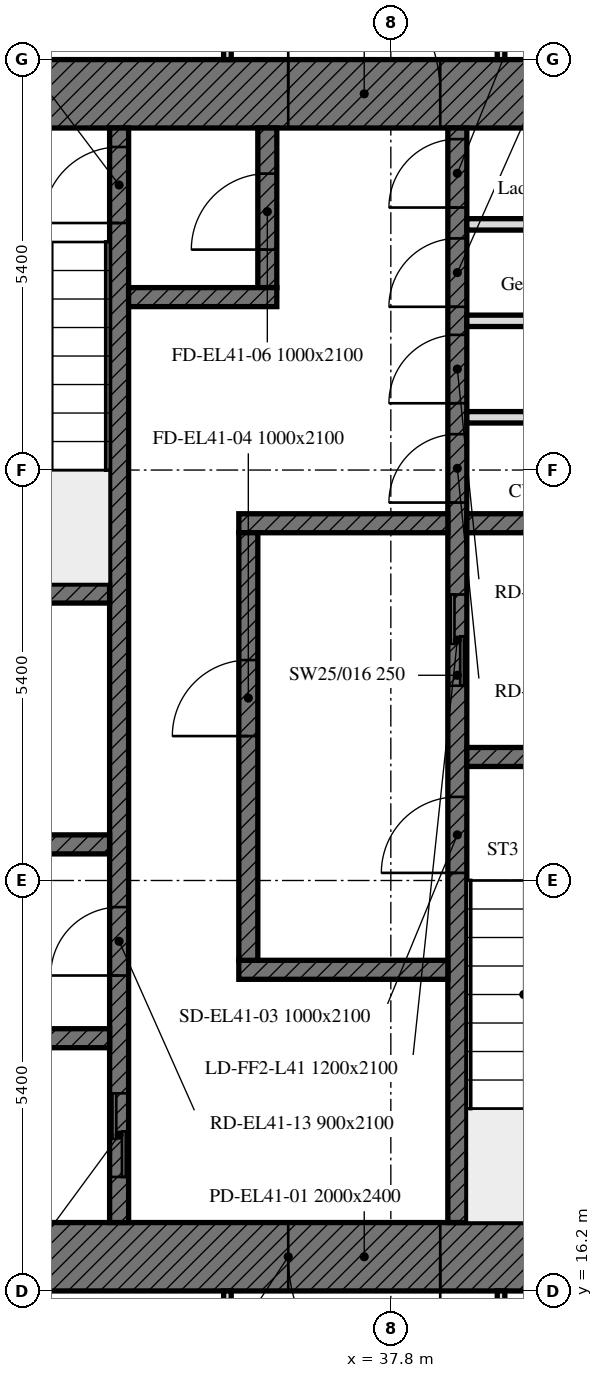
"""IFC4 building model, lengths in metres.
Left out: names, types, materials, properties, quantities, classifications, styles, units other than length and angle.
Written with IfcOpenShell. Run it as: python <this file> out.ifc"""

import sys

from ifc_helpers import new_model, si_unit, direction, frame, frame_2d, origin, place, context, subcontext, project, spatial, rectangle, extrude, element, fill, save


model = new_model("IFC4")
c1 = context("Model", 3, precision=1e-05, world=origin(), true_north=direction((0.0, 1.0)))
c2 = subcontext(c1, "Body", "Model", "MODEL_VIEW")
j1 = project(units=[si_unit("LENGTHUNIT", "METRE"), si_unit("PLANEANGLEUNIT", "RADIAN")], contexts=[c1])
p1 = place(None, origin())
s1 = spatial("IfcSite", under=j1, at=p1, CompositionType="ELEMENT")
p2 = place(p1, origin())
s2 = spatial("IfcBuilding", under=s1, at=p2, CompositionType="ELEMENT")
p3 = place(p2, frame((0.0, 0.0, 172.6)))
s3 = spatial("IfcBuildingStorey", under=s2, at=p3, CompositionType="ELEMENT", Elevation=172.6)
p4 = place(p3, frame((42.0, 16.65, 0.0), z_axis=(0.0, 0.0, 1.0), x_axis=(-1.0, 0.0, 0.0)))
e1 = element("IfcWall", 1, at=p4, inside=s3, PredefinedType="SOLIDWALL", context=c2, shape_type="SweptSolid", body=[
    extrude(rectangle(XDim=11.1, YDim=0.9, at=frame_2d((5.55, 0.0))), origin(), (0.0, 0.0, 1.0), 2.8),
])
p5 = place(p4, frame((3.55, 0.0, 0.0)))
e2 = element("IfcOpeningElement", 2, at=p5, cuts=e1, PredefinedType="OPENING", context=c2, shape_type="SweptSolid", body=[
    extrude(rectangle(XDim=2.0, YDim=2.4, at=frame_2d((1.0, 1.2))), frame((0.0, 0.45, 0.0), z_axis=(0.0, -1.0, 0.0), x_axis=(1.0, 0.0, 0.0)), (0.0, 0.0, 1.0), 0.9),
])
p6 = place(p3, frame((30.9, 31.95, 0.0), z_axis=(0.0, 0.0, 1.0), x_axis=(1.0, 0.0, 0.0)))
e3 = element("IfcWall", 3, at=p6, inside=s3, PredefinedType="SOLIDWALL", context=c2, shape_type="SweptSolid", body=[
    extrude(rectangle(XDim=11.1, YDim=0.9, at=frame_2d((5.55, 0.0))), origin(), (0.0, 0.0, 1.0), 2.8),
])
p7 = place(p6, frame((5.55, 0.0, 0.0)))
e4 = element("IfcOpeningElement", 4, at=p7, cuts=e3, PredefinedType="OPENING", context=c2, shape_type="SweptSolid", body=[
    extrude(rectangle(XDim=2.0, YDim=2.4, at=frame_2d((1.0, 1.2))), frame((0.0, 0.45, 0.0), z_axis=(0.0, -1.0, 0.0), x_axis=(1.0, 0.0, 0.0)), (0.0, 0.0, 1.0), 0.9),
])
p8 = place(p3, frame((38.675, 17.1, 0.0), z_axis=(0.0, 0.0, 1.0), x_axis=(0.0, 1.0, 0.0)))
e5 = element("IfcWall", 5, at=p8, inside=s3, PredefinedType="SOLIDWALL", context=c2, shape_type="SweptSolid", body=[
    extrude(rectangle(XDim=14.4, YDim=0.25, at=frame_2d((7.2, 0.0))), origin(), (0.0, 0.0, 1.0), 2.8),
])
p9 = place(p8, frame((4.6, 0.0, 0.0)))
e6 = element("IfcOpeningElement", 6, at=p9, cuts=e5, PredefinedType="OPENING", context=c2, shape_type="SweptSolid", body=[
    extrude(rectangle(XDim=1.0, YDim=2.1, at=frame_2d((0.5, 1.05))), frame((0.0, 0.125, 0.0), z_axis=(0.0, -1.0, 0.0), x_axis=(1.0, 0.0, 0.0)), (0.0, 0.0, 1.0), 0.25),
])
p10 = place(p8, frame((7.062, 0.0, 0.0)))
e7 = element("IfcOpeningElement", 7, at=p10, cuts=e5, PredefinedType="OPENING", context=c2, shape_type="SweptSolid", body=[
    extrude(rectangle(XDim=1.2, YDim=2.1, at=frame_2d((0.6, 1.05))), frame((0.0, 0.125, 0.0), z_axis=(0.0, -1.0, 0.0), x_axis=(1.0, 0.0, 0.0)), (0.0, 0.0, 1.0), 0.25),
])
p11 = place(p8, frame((9.472, 0.0, 0.0)))
e8 = element("IfcOpeningElement", 8, at=p11, cuts=e5, PredefinedType="OPENING", context=c2, shape_type="SweptSolid", body=[
    extrude(rectangle(XDim=0.9, YDim=2.1, at=frame_2d((0.45, 1.05))), frame((0.0, 0.125, 0.0), z_axis=(0.0, -1.0, 0.0), x_axis=(1.0, 0.0, 0.0)), (0.0, 0.0, 1.0), 0.25),
])
p12 = place(p8, frame((10.779, 0.0, 0.0)))
e9 = element("IfcOpeningElement", 9, at=p12, cuts=e5, PredefinedType="OPENING", context=c2, shape_type="SweptSolid", body=[
    extrude(rectangle(XDim=0.9, YDim=2.1, at=frame_2d((0.45, 1.05))), frame((0.0, 0.125, 0.0), z_axis=(0.0, -1.0, 0.0), x_axis=(1.0, 0.0, 0.0)), (0.0, 0.0, 1.0), 0.25),
])
p13 = place(p8, frame((12.048, 0.0, 0.0)))
e10 = element("IfcOpeningElement", 10, at=p13, cuts=e5, PredefinedType="OPENING", context=c2, shape_type="SweptSolid", body=[
    extrude(rectangle(XDim=0.9, YDim=2.1, at=frame_2d((0.45, 1.05))), frame((0.0, 0.125, 0.0), z_axis=(0.0, -1.0, 0.0), x_axis=(1.0, 0.0, 0.0)), (0.0, 0.0, 1.0), 0.25),
])
p14 = place(p8, frame((13.354, 0.0, 0.0)))
e11 = element("IfcOpeningElement", 11, at=p14, cuts=e5, PredefinedType="OPENING", context=c2, shape_type="SweptSolid", body=[
    extrude(rectangle(XDim=0.9, YDim=2.1, at=frame_2d((0.45, 1.05))), frame((0.0, 0.125, 0.0), z_axis=(0.0, -1.0, 0.0), x_axis=(1.0, 0.0, 0.0)), (0.0, 0.0, 1.0), 0.25),
])
p15 = place(p3, frame((34.225, 17.1, 0.0), z_axis=(0.0, 0.0, 1.0), x_axis=(0.0, 1.0, 0.0)))
e12 = element("IfcWall", 12, at=p15, inside=s3, PredefinedType="SOLIDWALL", context=c2, shape_type="SweptSolid", body=[
    extrude(rectangle(XDim=14.4, YDim=0.25, at=frame_2d((7.2, 0.0))), origin(), (0.0, 0.0, 1.0), 2.8),
])
p16 = place(p15, frame((13.15, 0.0, 0.0)))
e13 = element("IfcOpeningElement", 13, at=p16, cuts=e12, PredefinedType="OPENING", context=c2, shape_type="SweptSolid", body=[
    extrude(rectangle(XDim=1.0, YDim=2.1, at=frame_2d((0.5, 1.05))), frame((0.0, 0.125, 0.0), z_axis=(0.0, -1.0, 0.0), x_axis=(1.0, 0.0, 0.0)), (0.0, 0.0, 1.0), 0.25),
])
p17 = place(p15, frame((0.6, 0.0, 0.0)))
e14 = element("IfcOpeningElement", 14, at=p17, cuts=e12, PredefinedType="OPENING", context=c2, shape_type="SweptSolid", body=[
    extrude(rectangle(XDim=1.1, YDim=2.1, at=frame_2d((0.55, 1.05))), frame((0.0, 0.125, 0.0), z_axis=(0.0, -1.0, 0.0), x_axis=(1.0, 0.0, 0.0)), (0.0, 0.0, 1.0), 0.25),
])
p18 = place(p15, frame((3.25, 0.0, 0.0)))
e15 = element("IfcOpeningElement", 15, at=p18, cuts=e12, PredefinedType="OPENING", context=c2, shape_type="SweptSolid", body=[
    extrude(rectangle(XDim=0.9, YDim=2.1, at=frame_2d((0.45, 1.05))), frame((0.0, 0.125, 0.0), z_axis=(0.0, -1.0, 0.0), x_axis=(1.0, 0.0, 0.0)), (0.0, 0.0, 1.0), 0.25),
])
p19 = place(p3, frame((38.8, 23.225, 0.0), z_axis=(0.0, 0.0, 1.0), x_axis=(1.0, 0.0, 0.0)))
e16 = element("IfcWall", 16, at=p19, inside=s3, PredefinedType="SOLIDWALL", context=c2, shape_type="SweptSolid", body=[
    extrude(rectangle(XDim=3.2, YDim=0.25, at=frame_2d((1.6, 0.0))), origin(), (0.0, 0.0, 1.0), 2.8),
])
for number, where, z_axis, x_axis in (
    (17, (30.9, 25.375, 0.0), (0.0, 0.0, 1.0), (1.0, 0.0, 0.0)),
    (18, (30.9, 22.075, 0.0), (0.0, 0.0, 1.0), (1.0, 0.0, 0.0)),
):
    element("IfcWall", number, at=place(p3, frame(where, z_axis=z_axis, x_axis=x_axis)), inside=s3, PredefinedType="SOLIDWALL", context=c2, shape_type="SweptSolid", body=[
        extrude(rectangle(XDim=3.2, YDim=0.25, at=frame_2d((1.6, 0.0))), origin(), (0.0, 0.0, 1.0), 2.8),
    ])
p20 = place(p3, frame((38.8, 26.3, 0.0), z_axis=(0.0, 0.0, 1.0), x_axis=(1.0, 0.0, 0.0)))
e19 = element("IfcWall", 19, at=p20, inside=s3, PredefinedType="SOLIDWALL", context=c2, shape_type="SweptSolid", body=[
    extrude(rectangle(XDim=3.2, YDim=0.25, at=frame_2d((1.6, 0.0))), origin(), (0.0, 0.0, 1.0), 2.8),
])
for number, where, z_axis, x_axis in (
    (20, (35.8, 26.3, 0.0), (0.0, 0.0, 1.0), (1.0, 0.0, 0.0)),
    (21, (35.8, 20.425, 0.0), (0.0, 0.0, 1.0), (1.0, 0.0, 0.0)),
):
    element("IfcWall", number, at=place(p3, frame(where, z_axis=z_axis, x_axis=x_axis)), inside=s3, PredefinedType="SOLIDWALL", context=c2, shape_type="SweptSolid", body=[
        extrude(rectangle(XDim=2.75, YDim=0.25, at=frame_2d((1.375, 0.0))), origin(), (0.0, 0.0, 1.0), 2.8),
    ])
p21 = place(p3, frame((36.175, 29.4, 0.0), z_axis=(0.0, 0.0, 1.0), x_axis=(0.0, 1.0, 0.0)))
e22 = element("IfcWall", 22, at=p21, inside=s3, PredefinedType="SOLIDWALL", context=c2, shape_type="SweptSolid", body=[
    extrude(rectangle(XDim=2.1, YDim=0.25, at=frame_2d((1.05, 0.0))), origin(), (0.0, 0.0, 1.0), 2.8),
])
p22 = place(p21, frame((0.5, 0.0, 0.0)))
e23 = element("IfcOpeningElement", 23, at=p22, cuts=e22, PredefinedType="OPENING", context=c2, shape_type="SweptSolid", body=[
    extrude(rectangle(XDim=1.0, YDim=2.1, at=frame_2d((0.5, 1.05))), frame((0.0, 0.125, 0.0), z_axis=(0.0, -1.0, 0.0), x_axis=(1.0, 0.0, 0.0)), (0.0, 0.0, 1.0), 0.25),
])
p23 = place(p3, frame((34.35, 29.275, 0.0), z_axis=(0.0, 0.0, 1.0), x_axis=(1.0, 0.0, 0.0)))
e24 = element("IfcWall", 24, at=p23, inside=s3, PredefinedType="SOLIDWALL", context=c2, shape_type="SweptSolid", body=[
    extrude(rectangle(XDim=1.95, YDim=0.25, at=frame_2d((0.975, 0.0))), origin(), (0.0, 0.0, 1.0), 2.8),
])
p24 = place(p3, frame((35.925, 20.55, 0.0), z_axis=(0.0, 0.0, 1.0), x_axis=(0.0, 1.0, 0.0)))
e25 = element("IfcWall", 25, at=p24, inside=s3, PredefinedType="SOLIDWALL", context=c2, shape_type="SweptSolid", body=[
    extrude(rectangle(XDim=5.625, YDim=0.25, at=frame_2d((2.812, 0.0))), origin(), (0.0, 0.0, 1.0), 2.8),
])
p25 = place(p24, frame((2.95, 0.0, 0.0)))
e26 = element("IfcOpeningElement", 26, at=p25, cuts=e25, PredefinedType="OPENING", context=c2, shape_type="SweptSolid", body=[
    extrude(rectangle(XDim=1.0, YDim=2.1, at=frame_2d((0.5, 1.05))), frame((0.0, 0.125, 0.0), z_axis=(0.0, -1.0, 0.0), x_axis=(1.0, 0.0, 0.0)), (0.0, 0.0, 1.0), 0.25),
])
p26 = place(p3, frame((30.9, 19.525, 0.0), z_axis=(0.0, 0.0, 1.0), x_axis=(1.0, 0.0, 0.0)))
e27 = element("IfcWall", 27, at=p26, inside=s3, PredefinedType="SOLIDWALL", context=c2, shape_type="SweptSolid", body=[
    extrude(rectangle(XDim=3.2, YDim=0.25, at=frame_2d((1.6, 0.0))), origin(), (0.0, 0.0, 1.0), 2.8),
])
for number, where, z_axis, x_axis in (
    (28, (38.8, 27.694, 0.0), (0.0, 0.0, 1.0), (1.0, 0.0, 0.0)),
    (29, (38.8, 28.963, 0.0), (0.0, 0.0, 1.0), (1.0, 0.0, 0.0)),
    (30, (38.8, 30.232, 0.0), (0.0, 0.0, 1.0), (1.0, 0.0, 0.0)),
):
    element("IfcWall", number, at=place(p3, frame(where, z_axis=z_axis, x_axis=x_axis)), inside=s3, PredefinedType="PARTITIONING", context=c2, shape_type="SweptSolid", body=[
        extrude(rectangle(XDim=3.2, YDim=0.15, at=frame_2d((1.6, 0.0))), origin(), (0.0, 0.0, 1.0), 2.8),
    ])
for number, where, z_axis, x_axis in (
    (31, (35.65, 35.475, 0.0), (0.0, 0.0, 1.0), (0.0, -1.0, 0.0)),
    (32, (39.25, 32.4, 0.0), (0.0, 0.0, 1.0), (0.0, 1.0, 0.0)),
):
    element("IfcWall", number, at=place(p3, frame(where, z_axis=z_axis, x_axis=x_axis)), inside=s3, PredefinedType="PARTITIONING", context=c2, shape_type="SweptSolid", body=[
        extrude(rectangle(XDim=3.075, YDim=0.1, at=frame_2d((1.538, 0.0))), origin(), (0.0, 0.0, 1.0), 2.8),
    ])
for number, where, z_axis, x_axis in (
    (33, (35.65, 16.2, 0.0), (0.0, 0.0, 1.0), (0.0, -1.0, 0.0)),
    (34, (39.25, 9.975, 0.0), (0.0, 0.0, 1.0), (0.0, 1.0, 0.0)),
):
    element("IfcWall", number, at=place(p3, frame(where, z_axis=z_axis, x_axis=x_axis)), inside=s3, PredefinedType="PARTITIONING", context=c2, shape_type="SweptSolid", body=[
        extrude(rectangle(XDim=6.225, YDim=0.1, at=frame_2d((3.112, 0.0))), origin(), (0.0, 0.0, 1.0), 2.2),
    ])
p27 = place(p5, origin())
e35 = element("IfcDoor", 35, at=p27, inside=s3, OperationType="DOUBLE_DOOR_SINGLE_SWING", PredefinedType="DOOR", context=c2, shape_type="SweptSolid", body=[
    extrude(rectangle(XDim=2.0, YDim=2.4, at=frame_2d((1.0, 1.2))), frame((0.0, 0.025, 0.0), z_axis=(0.0, -1.0, 0.0), x_axis=(1.0, 0.0, 0.0)), (0.0, 0.0, 1.0), 0.05),
])
fill(e2, e35)
p28 = place(p7, origin())
e36 = element("IfcDoor", 36, at=p28, inside=s3, OperationType="DOUBLE_DOOR_SINGLE_SWING", PredefinedType="DOOR", context=c2, shape_type="SweptSolid", body=[
    extrude(rectangle(XDim=2.0, YDim=2.4, at=frame_2d((1.0, 1.2))), frame((0.0, 0.025, 0.0), z_axis=(0.0, -1.0, 0.0), x_axis=(1.0, 0.0, 0.0)), (0.0, 0.0, 1.0), 0.05),
])
fill(e4, e36)
p29 = place(p9, origin())
e37 = element("IfcDoor", 37, at=p29, inside=s3, OperationType="SINGLE_SWING_LEFT", PredefinedType="DOOR", context=c2, shape_type="SweptSolid", body=[
    extrude(rectangle(XDim=1.0, YDim=2.1, at=frame_2d((0.5, 1.05))), frame((0.0, 0.025, 0.0), z_axis=(0.0, -1.0, 0.0), x_axis=(1.0, 0.0, 0.0)), (0.0, 0.0, 1.0), 0.05),
])
fill(e6, e37)
p30 = place(p25, origin())
e38 = element("IfcDoor", 38, at=p30, inside=s3, OperationType="SINGLE_SWING_LEFT", PredefinedType="DOOR", context=c2, shape_type="SweptSolid", body=[
    extrude(rectangle(XDim=1.0, YDim=2.1, at=frame_2d((0.5, 1.05))), frame((0.0, 0.025, 0.0), z_axis=(0.0, -1.0, 0.0), x_axis=(1.0, 0.0, 0.0)), (0.0, 0.0, 1.0), 0.05),
])
fill(e26, e38)
p31 = place(p16, origin())
e39 = element("IfcDoor", 39, at=p31, inside=s3, OperationType="SINGLE_SWING_LEFT", PredefinedType="DOOR", context=c2, shape_type="SweptSolid", body=[
    extrude(rectangle(XDim=1.0, YDim=2.1, at=frame_2d((0.5, 1.05))), frame((0.0, 0.025, 0.0), z_axis=(0.0, -1.0, 0.0), x_axis=(1.0, 0.0, 0.0)), (0.0, 0.0, 1.0), 0.05),
])
fill(e13, e39)
p32 = place(p22, origin())
e40 = element("IfcDoor", 40, at=p32, inside=s3, OperationType="SINGLE_SWING_LEFT", PredefinedType="DOOR", context=c2, shape_type="SweptSolid", body=[
    extrude(rectangle(XDim=1.0, YDim=2.1, at=frame_2d((0.5, 1.05))), frame((0.0, 0.025, 0.0), z_axis=(0.0, -1.0, 0.0), x_axis=(1.0, 0.0, 0.0)), (0.0, 0.0, 1.0), 0.05),
])
fill(e23, e40)
p33 = place(p10, origin())
e41 = element("IfcDoor", 41, at=p33, inside=s3, OperationType="DOUBLE_DOOR_SLIDING", PredefinedType="DOOR", context=c2, shape_type="SweptSolid", body=[
    extrude(rectangle(XDim=1.2, YDim=2.1, at=frame_2d((0.6, 1.05))), frame((0.0, 0.025, 0.0), z_axis=(0.0, -1.0, 0.0), x_axis=(1.0, 0.0, 0.0)), (0.0, 0.0, 1.0), 0.05),
])
fill(e7, e41)
p34 = place(p17, origin())
e42 = element("IfcDoor", 42, at=p34, inside=s3, OperationType="DOUBLE_DOOR_SLIDING", PredefinedType="DOOR", context=c2, shape_type="SweptSolid", body=[
    extrude(rectangle(XDim=1.1, YDim=2.1, at=frame_2d((0.55, 1.05))), frame((0.0, 0.025, 0.0), z_axis=(0.0, -1.0, 0.0), x_axis=(1.0, 0.0, 0.0)), (0.0, 0.0, 1.0), 0.05),
])
fill(e14, e42)
p35 = place(p11, origin())
e43 = element("IfcDoor", 43, at=p35, inside=s3, OperationType="SINGLE_SWING_LEFT", PredefinedType="DOOR", context=c2, shape_type="SweptSolid", body=[
    extrude(rectangle(XDim=0.9, YDim=2.1, at=frame_2d((0.45, 1.05))), frame((0.0, 0.025, 0.0), z_axis=(0.0, -1.0, 0.0), x_axis=(1.0, 0.0, 0.0)), (0.0, 0.0, 1.0), 0.05),
])
fill(e8, e43)
p36 = place(p12, origin())
e44 = element("IfcDoor", 44, at=p36, inside=s3, OperationType="SINGLE_SWING_LEFT", PredefinedType="DOOR", context=c2, shape_type="SweptSolid", body=[
    extrude(rectangle(XDim=0.9, YDim=2.1, at=frame_2d((0.45, 1.05))), frame((0.0, 0.025, 0.0), z_axis=(0.0, -1.0, 0.0), x_axis=(1.0, 0.0, 0.0)), (0.0, 0.0, 1.0), 0.05),
])
fill(e9, e44)
p37 = place(p13, origin())
e45 = element("IfcDoor", 45, at=p37, inside=s3, OperationType="SINGLE_SWING_LEFT", PredefinedType="DOOR", context=c2, shape_type="SweptSolid", body=[
    extrude(rectangle(XDim=0.9, YDim=2.1, at=frame_2d((0.45, 1.05))), frame((0.0, 0.025, 0.0), z_axis=(0.0, -1.0, 0.0), x_axis=(1.0, 0.0, 0.0)), (0.0, 0.0, 1.0), 0.05),
])
fill(e10, e45)
p38 = place(p14, origin())
e46 = element("IfcDoor", 46, at=p38, inside=s3, OperationType="SINGLE_SWING_LEFT", PredefinedType="DOOR", context=c2, shape_type="SweptSolid", body=[
    extrude(rectangle(XDim=0.9, YDim=2.1, at=frame_2d((0.45, 1.05))), frame((0.0, 0.025, 0.0), z_axis=(0.0, -1.0, 0.0), x_axis=(1.0, 0.0, 0.0)), (0.0, 0.0, 1.0), 0.05),
])
fill(e11, e46)
p39 = place(p18, origin())
e47 = element("IfcDoor", 47, at=p39, inside=s3, OperationType="SINGLE_SWING_LEFT", PredefinedType="DOOR", context=c2, shape_type="SweptSolid", body=[
    extrude(rectangle(XDim=0.9, YDim=2.1, at=frame_2d((0.45, 1.05))), frame((0.0, 0.025, 0.0), z_axis=(0.0, -1.0, 0.0), x_axis=(1.0, 0.0, 0.0)), (0.0, 0.0, 1.0), 0.05),
])
fill(e15, e47)
save(model, sys.argv[1])
